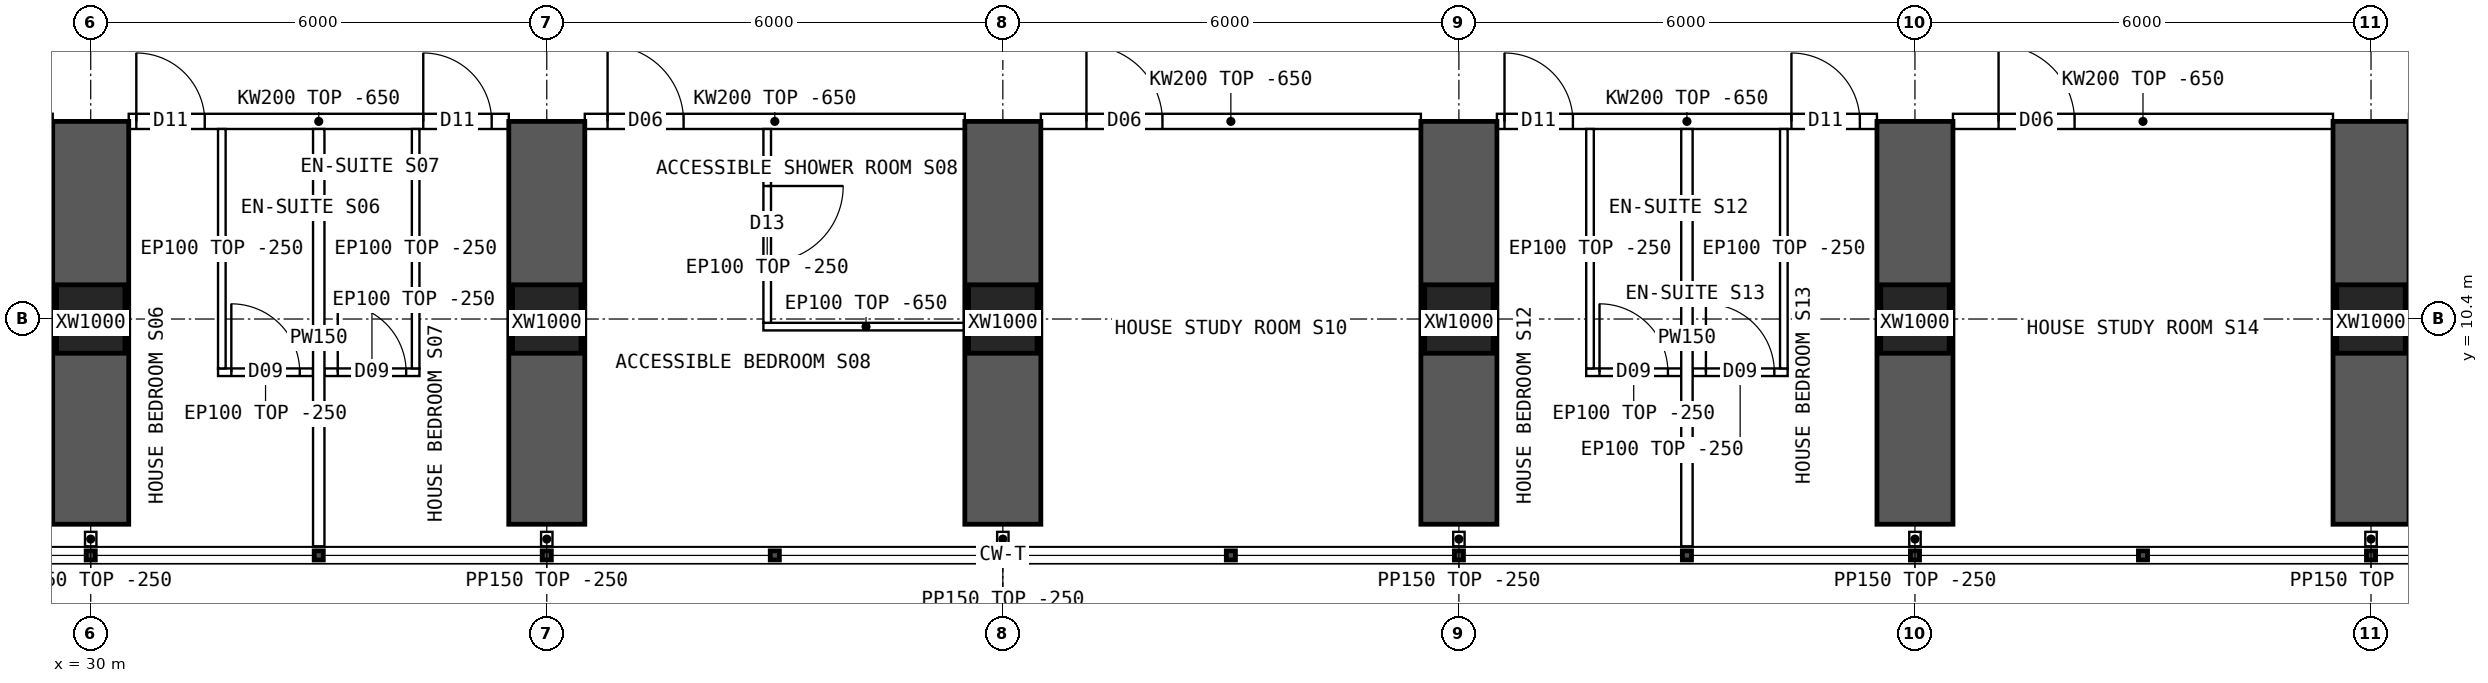
"""IFC4 building model, lengths in metres.
Left out: names, types, materials, properties, quantities, classifications, styles, units other than length and angle.
Written with IfcOpenShell. Run it as: python <this file> out.ifc"""

import sys

from ifc_helpers import new_model, si_unit, direction, frame, frame_2d, origin, origin_2d, place, context, subcontext, project, spatial, polyline, rectangle, hollow_rectangle, outline, extrude, element, fill, save


model = new_model("IFC4")
c1 = context("Model", 3, precision=1e-05, world=origin(), true_north=direction((0.0, 1.0)))
c2 = subcontext(c1, "Body", "Model", "MODEL_VIEW")
j1 = project(units=[si_unit("LENGTHUNIT", "METRE"), si_unit("PLANEANGLEUNIT", "RADIAN")], contexts=[c1])
p1 = place(None, origin())
s1 = spatial("IfcSite", under=j1, at=p1, CompositionType="ELEMENT")
p2 = place(p1, origin())
s2 = spatial("IfcBuilding", under=s1, at=p2, CompositionType="ELEMENT")
p3 = place(p2, frame((0.0, 0.0, 57.7)))
s3 = spatial("IfcBuildingStorey", under=s2, at=p3, CompositionType="ELEMENT", Elevation=57.7)
for number, where, z_axis, x_axis in (
    (1, (30.0, 10.4, 0.0), (0.0, 0.0, 1.0), (1.0, 0.0, 0.0)),
    (2, (36.0, 10.4, 0.0), (0.0, 0.0, 1.0), (1.0, 0.0, 0.0)),
    (3, (42.0, 10.4, 0.0), (0.0, 0.0, 1.0), (1.0, 0.0, 0.0)),
    (4, (48.0, 10.4, 0.0), (0.0, 0.0, 1.0), (1.0, 0.0, 0.0)),
    (5, (54.0, 10.4, 0.0), (0.0, 0.0, 1.0), (1.0, 0.0, 0.0)),
    (6, (60.0, 10.4, 0.0), (0.0, 0.0, 1.0), (1.0, 0.0, 0.0)),
):
    element("IfcColumn", number, at=place(p3, frame(where, z_axis=z_axis, x_axis=x_axis)), inside=s3, PredefinedType="COLUMN", context=c2, shape_type="SweptSolid", body=[
        extrude(hollow_rectangle(XDim=0.9, YDim=0.9, WallThickness=0.09, at=origin_2d()), origin(), (0.0, 0.0, 1.0), 3.75),
    ])
for number, where, z_axis, x_axis in (
    (7, (30.0, 7.7, 0.0), (0.0, 0.0, 1.0), (0.0, 1.0, 0.0)),
    (8, (36.0, 7.7, 0.0), (0.0, 0.0, 1.0), (0.0, 1.0, 0.0)),
    (9, (42.0, 7.7, 0.0), (0.0, 0.0, 1.0), (0.0, 1.0, 0.0)),
    (10, (48.0, 7.7, 0.0), (0.0, 0.0, 1.0), (0.0, 1.0, 0.0)),
    (11, (54.0, 7.7, 0.0), (0.0, 0.0, 1.0), (0.0, 1.0, 0.0)),
    (12, (60.0, 7.7, 0.0), (0.0, 0.0, 1.0), (0.0, 1.0, 0.0)),
):
    element("IfcWall", number, at=place(p3, frame(where, z_axis=z_axis, x_axis=x_axis)), inside=s3, PredefinedType="SHEAR", context=c2, shape_type="SweptSolid", body=[
        extrude(rectangle(XDim=5.3, YDim=1.0, at=frame_2d((2.65, 0.0))), origin(), (0.0, 0.0, 1.0), 3.75),
    ])
p4 = place(p3, frame((30.5, 13.0, 0.0), z_axis=(0.0, 0.0, 1.0), x_axis=(1.0, 0.0, 0.0)))
e13 = element("IfcWall", 13, at=p4, inside=s3, PredefinedType="SOLIDWALL", context=c2, shape_type="SweptSolid", body=[
    extrude(outline(polyline([(0.0, 0.0), (5.0, 0.0), (5.0, 3.1), (0.0, 3.1), (0.0, 0.0)])), frame((0.0, 0.1, 0.0), z_axis=(0.0, -1.0, 0.0), x_axis=(1.0, 0.0, 0.0)), (0.0, 0.0, 1.0), 0.2),
])
p5 = place(p4, frame((0.1, 0.0, 0.0)))
e14 = element("IfcOpeningElement", 14, at=p5, cuts=e13, PredefinedType="OPENING", context=c2, shape_type="SweptSolid", body=[
    extrude(rectangle(XDim=0.9, YDim=2.1, at=frame_2d((0.45, 1.05))), frame((0.0, 0.11, 0.0), z_axis=(0.0, -1.0, 0.0), x_axis=(1.0, 0.0, 0.0)), (0.0, 0.0, 1.0), 0.22),
])
p6 = place(p4, frame((3.875, 0.0, 0.0)))
e15 = element("IfcOpeningElement", 15, at=p6, cuts=e13, PredefinedType="OPENING", context=c2, shape_type="SweptSolid", body=[
    extrude(rectangle(XDim=0.9, YDim=2.1, at=frame_2d((0.45, 1.05))), frame((0.0, 0.11, 0.0), z_axis=(0.0, -1.0, 0.0), x_axis=(1.0, 0.0, 0.0)), (0.0, 0.0, 1.0), 0.22),
])
p7 = place(p3, frame((36.5, 13.0, 0.0), z_axis=(0.0, 0.0, 1.0), x_axis=(1.0, 0.0, 0.0)))
e16 = element("IfcWall", 16, at=p7, inside=s3, PredefinedType="SOLIDWALL", context=c2, shape_type="SweptSolid", body=[
    extrude(outline(polyline([(0.0, 0.0), (5.0, 0.0), (5.0, 3.1), (0.0, 3.1), (0.0, 0.0)])), frame((0.0, 0.1, 0.0), z_axis=(0.0, -1.0, 0.0), x_axis=(1.0, 0.0, 0.0)), (0.0, 0.0, 1.0), 0.2),
])
p8 = place(p7, frame((0.3, 0.0, 0.0)))
e17 = element("IfcOpeningElement", 17, at=p8, cuts=e16, PredefinedType="OPENING", context=c2, shape_type="SweptSolid", body=[
    extrude(rectangle(XDim=1.0, YDim=2.1, at=frame_2d((0.5, 1.05))), frame((0.0, 0.11, 0.0), z_axis=(0.0, -1.0, 0.0), x_axis=(1.0, 0.0, 0.0)), (0.0, 0.0, 1.0), 0.22),
])
p9 = place(p3, frame((42.5, 13.0, 0.0), z_axis=(0.0, 0.0, 1.0), x_axis=(1.0, 0.0, 0.0)))
e18 = element("IfcWall", 18, at=p9, inside=s3, PredefinedType="SOLIDWALL", context=c2, shape_type="SweptSolid", body=[
    extrude(outline(polyline([(0.0, 0.0), (5.0, 0.0), (5.0, 3.1), (0.0, 3.1), (0.0, 0.0)])), frame((0.0, 0.1, 0.0), z_axis=(0.0, -1.0, 0.0), x_axis=(1.0, 0.0, 0.0)), (0.0, 0.0, 1.0), 0.2),
])
p10 = place(p9, frame((0.6, 0.0, 0.0)))
e19 = element("IfcOpeningElement", 19, at=p10, cuts=e18, PredefinedType="OPENING", context=c2, shape_type="SweptSolid", body=[
    extrude(rectangle(XDim=1.0, YDim=2.1, at=frame_2d((0.5, 1.05))), frame((0.0, 0.11, 0.0), z_axis=(0.0, -1.0, 0.0), x_axis=(1.0, 0.0, 0.0)), (0.0, 0.0, 1.0), 0.22),
])
p11 = place(p3, frame((48.5, 13.0, 0.0), z_axis=(0.0, 0.0, 1.0), x_axis=(1.0, 0.0, 0.0)))
e20 = element("IfcWall", 20, at=p11, inside=s3, PredefinedType="SOLIDWALL", context=c2, shape_type="SweptSolid", body=[
    extrude(outline(polyline([(0.0, 0.0), (5.0, 0.0), (5.0, 3.1), (0.0, 3.1), (0.0, 0.0)])), frame((0.0, 0.1, 0.0), z_axis=(0.0, -1.0, 0.0), x_axis=(1.0, 0.0, 0.0)), (0.0, 0.0, 1.0), 0.2),
])
p12 = place(p11, frame((0.1, 0.0, 0.0)))
e21 = element("IfcOpeningElement", 21, at=p12, cuts=e20, PredefinedType="OPENING", context=c2, shape_type="SweptSolid", body=[
    extrude(rectangle(XDim=0.9, YDim=2.1, at=frame_2d((0.45, 1.05))), frame((0.0, 0.11, 0.0), z_axis=(0.0, -1.0, 0.0), x_axis=(1.0, 0.0, 0.0)), (0.0, 0.0, 1.0), 0.22),
])
p13 = place(p11, frame((3.875, 0.0, 0.0)))
e22 = element("IfcOpeningElement", 22, at=p13, cuts=e20, PredefinedType="OPENING", context=c2, shape_type="SweptSolid", body=[
    extrude(rectangle(XDim=0.9, YDim=2.1, at=frame_2d((0.45, 1.05))), frame((0.0, 0.11, 0.0), z_axis=(0.0, -1.0, 0.0), x_axis=(1.0, 0.0, 0.0)), (0.0, 0.0, 1.0), 0.22),
])
p14 = place(p3, frame((54.5, 13.0, 0.0), z_axis=(0.0, 0.0, 1.0), x_axis=(1.0, 0.0, 0.0)))
e23 = element("IfcWall", 23, at=p14, inside=s3, PredefinedType="SOLIDWALL", context=c2, shape_type="SweptSolid", body=[
    extrude(outline(polyline([(0.0, 0.0), (5.0, 0.0), (5.0, 3.1), (0.0, 3.1), (0.0, 0.0)])), frame((0.0, 0.1, 0.0), z_axis=(0.0, -1.0, 0.0), x_axis=(1.0, 0.0, 0.0)), (0.0, 0.0, 1.0), 0.2),
])
p15 = place(p14, frame((0.6, 0.0, 0.0)))
e24 = element("IfcOpeningElement", 24, at=p15, cuts=e23, PredefinedType="OPENING", context=c2, shape_type="SweptSolid", body=[
    extrude(rectangle(XDim=1.0, YDim=2.1, at=frame_2d((0.5, 1.05))), frame((0.0, 0.11, 0.0), z_axis=(0.0, -1.0, 0.0), x_axis=(1.0, 0.0, 0.0)), (0.0, 0.0, 1.0), 0.22),
])
p16 = place(p3, frame((33.0, 7.41, 0.0), z_axis=(0.0, 0.0, 1.0), x_axis=(0.0, 1.0, 0.0)))
e25 = element("IfcWall", 25, at=p16, inside=s3, PredefinedType="PARTITIONING", context=c2, shape_type="SweptSolid", body=[
    extrude(outline(polyline([(0.0, 0.0), (5.49, 0.0), (5.49, 3.1), (5.442, 3.1), (5.44, 3.5), (3.192, 3.5), (3.19, 3.1), (2.792, 3.1), (2.79, 3.5), (0.0, 3.5), (0.0, 0.0)])), frame((0.0, 0.075, 0.0), z_axis=(0.0, -1.0, 0.0), x_axis=(1.0, 0.0, 0.0)), (0.0, 0.0, 1.0), 0.15),
])
p17 = place(p3, frame((32.925, 9.7, 0.0), z_axis=(0.0, 0.0, 1.0), x_axis=(-1.0, 0.0, 0.0)))
e26 = element("IfcWall", 26, at=p17, inside=s3, PredefinedType="PARTITIONING", context=c2, shape_type="SweptSolid", body=[
    extrude(rectangle(XDim=1.25, YDim=0.1, at=frame_2d((0.625, 0.0))), origin(), (0.0, 0.0, 1.0), 3.5),
])
p18 = place(p17, frame((0.175, 0.0, 0.0)))
e27 = element("IfcOpeningElement", 27, at=p18, cuts=e26, PredefinedType="OPENING", context=c2, shape_type="SweptSolid", body=[
    extrude(rectangle(XDim=0.9, YDim=2.1, at=frame_2d((0.45, 1.05))), frame((0.0, 0.06, 0.0), z_axis=(0.0, -1.0, 0.0), x_axis=(1.0, 0.0, 0.0)), (0.0, 0.0, 1.0), 0.12),
])
p19 = place(p3, frame((31.725, 9.75, 0.0), z_axis=(0.0, 0.0, 1.0), x_axis=(0.0, 1.0, 0.0)))
e28 = element("IfcWall", 28, at=p19, inside=s3, PredefinedType="PARTITIONING", context=c2, shape_type="SweptSolid", body=[
    extrude(outline(polyline([(0.0, 0.0), (3.15, 0.0), (3.15, 3.1), (3.102, 3.1), (3.1, 3.5), (0.852, 3.5), (0.85, 3.1), (0.452, 3.1), (0.45, 3.5), (0.0, 3.5), (0.0, 0.0)])), frame((0.0, 0.05, 0.0), z_axis=(0.0, -1.0, 0.0), x_axis=(1.0, 0.0, 0.0)), (0.0, 0.0, 1.0), 0.1),
])
p20 = place(p3, frame((34.325, 9.7, 0.0), z_axis=(0.0, 0.0, 1.0), x_axis=(-1.0, 0.0, 0.0)))
e29 = element("IfcWall", 29, at=p20, inside=s3, PredefinedType="PARTITIONING", context=c2, shape_type="SweptSolid", body=[
    extrude(rectangle(XDim=1.25, YDim=0.1, at=frame_2d((0.625, 0.0))), origin(), (0.0, 0.0, 1.0), 3.5),
])
p21 = place(p20, frame((0.175, 0.0, 0.0)))
e30 = element("IfcOpeningElement", 30, at=p21, cuts=e29, PredefinedType="OPENING", context=c2, shape_type="SweptSolid", body=[
    extrude(rectangle(XDim=0.9, YDim=2.1, at=frame_2d((0.45, 1.05))), frame((0.0, 0.06, 0.0), z_axis=(0.0, -1.0, 0.0), x_axis=(1.0, 0.0, 0.0)), (0.0, 0.0, 1.0), 0.12),
])
p22 = place(p3, frame((34.275, 9.75, 0.0), z_axis=(0.0, 0.0, 1.0), x_axis=(0.0, 1.0, 0.0)))
e31 = element("IfcWall", 31, at=p22, inside=s3, PredefinedType="PARTITIONING", context=c2, shape_type="SweptSolid", body=[
    extrude(outline(polyline([(0.0, 0.0), (3.15, 0.0), (3.15, 3.1), (3.102, 3.1), (3.1, 3.5), (0.852, 3.5), (0.85, 3.1), (0.452, 3.1), (0.45, 3.5), (0.0, 3.5), (0.0, 0.0)])), frame((0.0, 0.05, 0.0), z_axis=(0.0, -1.0, 0.0), x_axis=(1.0, 0.0, 0.0)), (0.0, 0.0, 1.0), 0.1),
])
p23 = place(p3, frame((38.85, 10.3, 0.0), z_axis=(0.0, 0.0, 1.0), x_axis=(1.0, 0.0, 0.0)))
e32 = element("IfcWall", 32, at=p23, inside=s3, PredefinedType="PARTITIONING", context=c2, shape_type="SweptSolid", body=[
    extrude(outline(polyline([(0.0, 0.0), (2.7, 0.0), (2.7, 3.1), (0.0, 3.1), (0.0, 0.0)])), frame((0.0, 0.05, 0.0), z_axis=(0.0, -1.0, 0.0), x_axis=(1.0, 0.0, 0.0)), (0.0, 0.0, 1.0), 0.1),
])
p24 = place(p3, frame((38.9, 10.35, 0.0), z_axis=(0.0, 0.0, 1.0), x_axis=(0.0, 1.0, 0.0)))
e33 = element("IfcWall", 33, at=p24, inside=s3, PredefinedType="PARTITIONING", context=c2, shape_type="SweptSolid", body=[
    extrude(outline(polyline([(0.0, 0.0), (2.55, 0.0), (2.55, 3.1), (2.502, 3.1), (2.5, 3.5), (0.252, 3.5), (0.25, 3.1), (0.0, 3.1), (0.0, 0.0)])), frame((0.0, 0.05, 0.0), z_axis=(0.0, -1.0, 0.0), x_axis=(1.0, 0.0, 0.0)), (0.0, 0.0, 1.0), 0.1),
])
p25 = place(p24, frame((0.8, 0.0, 0.0)))
e34 = element("IfcOpeningElement", 34, at=p25, cuts=e33, PredefinedType="OPENING", context=c2, shape_type="SweptSolid", body=[
    extrude(rectangle(XDim=1.0, YDim=2.1, at=frame_2d((0.5, 1.05))), frame((0.0, 0.06, 0.0), z_axis=(0.0, -1.0, 0.0), x_axis=(1.0, 0.0, 0.0)), (0.0, 0.0, 1.0), 0.12),
])
p26 = place(p3, frame((51.0, 7.41, 0.0), z_axis=(0.0, 0.0, 1.0), x_axis=(0.0, 1.0, 0.0)))
e35 = element("IfcWall", 35, at=p26, inside=s3, PredefinedType="PARTITIONING", context=c2, shape_type="SweptSolid", body=[
    extrude(outline(polyline([(0.0, 0.0), (5.49, 0.0), (5.49, 3.1), (5.442, 3.1), (5.44, 3.5), (3.192, 3.5), (3.19, 3.1), (2.792, 3.1), (2.79, 3.5), (0.0, 3.5), (0.0, 0.0)])), frame((0.0, 0.075, 0.0), z_axis=(0.0, -1.0, 0.0), x_axis=(1.0, 0.0, 0.0)), (0.0, 0.0, 1.0), 0.15),
])
p27 = place(p3, frame((50.925, 9.7, 0.0), z_axis=(0.0, 0.0, 1.0), x_axis=(-1.0, 0.0, 0.0)))
e36 = element("IfcWall", 36, at=p27, inside=s3, PredefinedType="PARTITIONING", context=c2, shape_type="SweptSolid", body=[
    extrude(rectangle(XDim=1.25, YDim=0.1, at=frame_2d((0.625, 0.0))), origin(), (0.0, 0.0, 1.0), 3.5),
])
p28 = place(p27, frame((0.175, 0.0, 0.0)))
e37 = element("IfcOpeningElement", 37, at=p28, cuts=e36, PredefinedType="OPENING", context=c2, shape_type="SweptSolid", body=[
    extrude(rectangle(XDim=0.9, YDim=2.1, at=frame_2d((0.45, 1.05))), frame((0.0, 0.06, 0.0), z_axis=(0.0, -1.0, 0.0), x_axis=(1.0, 0.0, 0.0)), (0.0, 0.0, 1.0), 0.12),
])
p29 = place(p3, frame((49.725, 9.75, 0.0), z_axis=(0.0, 0.0, 1.0), x_axis=(0.0, 1.0, 0.0)))
e38 = element("IfcWall", 38, at=p29, inside=s3, PredefinedType="PARTITIONING", context=c2, shape_type="SweptSolid", body=[
    extrude(outline(polyline([(0.0, 0.0), (3.15, 0.0), (3.15, 3.1), (3.102, 3.1), (3.1, 3.5), (0.852, 3.5), (0.85, 3.1), (0.452, 3.1), (0.45, 3.5), (0.0, 3.5), (0.0, 0.0)])), frame((0.0, 0.05, 0.0), z_axis=(0.0, -1.0, 0.0), x_axis=(1.0, 0.0, 0.0)), (0.0, 0.0, 1.0), 0.1),
])
p30 = place(p3, frame((52.325, 9.7, 0.0), z_axis=(0.0, 0.0, 1.0), x_axis=(-1.0, 0.0, 0.0)))
e39 = element("IfcWall", 39, at=p30, inside=s3, PredefinedType="PARTITIONING", context=c2, shape_type="SweptSolid", body=[
    extrude(rectangle(XDim=1.25, YDim=0.1, at=frame_2d((0.625, 0.0))), origin(), (0.0, 0.0, 1.0), 3.5),
])
p31 = place(p30, frame((0.175, 0.0, 0.0)))
e40 = element("IfcOpeningElement", 40, at=p31, cuts=e39, PredefinedType="OPENING", context=c2, shape_type="SweptSolid", body=[
    extrude(rectangle(XDim=0.9, YDim=2.1, at=frame_2d((0.45, 1.05))), frame((0.0, 0.06, 0.0), z_axis=(0.0, -1.0, 0.0), x_axis=(1.0, 0.0, 0.0)), (0.0, 0.0, 1.0), 0.12),
])
p32 = place(p3, frame((52.275, 9.75, 0.0), z_axis=(0.0, 0.0, 1.0), x_axis=(0.0, 1.0, 0.0)))
e41 = element("IfcWall", 41, at=p32, inside=s3, PredefinedType="PARTITIONING", context=c2, shape_type="SweptSolid", body=[
    extrude(outline(polyline([(0.0, 0.0), (3.15, 0.0), (3.15, 3.1), (3.102, 3.1), (3.1, 3.5), (0.852, 3.5), (0.85, 3.1), (0.452, 3.1), (0.45, 3.5), (0.0, 3.5), (0.0, 0.0)])), frame((0.0, 0.05, 0.0), z_axis=(0.0, -1.0, 0.0), x_axis=(1.0, 0.0, 0.0)), (0.0, 0.0, 1.0), 0.1),
])
for number, where, z_axis, x_axis in (
    (42, (30.0, 7.6, 0.0), (0.0, 0.0, 1.0), (0.0, -1.0, 0.0)),
    (43, (36.0, 7.6, 0.0), (0.0, 0.0, 1.0), (0.0, -1.0, 0.0)),
    (44, (42.0, 7.6, 0.0), (0.0, 0.0, 1.0), (0.0, -1.0, 0.0)),
    (45, (48.0, 7.6, 0.0), (0.0, 0.0, 1.0), (0.0, -1.0, 0.0)),
    (46, (54.0, 7.6, 0.0), (0.0, 0.0, 1.0), (0.0, -1.0, 0.0)),
    (47, (60.0, 7.6, 0.0), (0.0, 0.0, 1.0), (0.0, -1.0, 0.0)),
):
    element("IfcWall", number, at=place(p3, frame(where, z_axis=z_axis, x_axis=x_axis)), inside=s3, PredefinedType="PARTITIONING", context=c2, shape_type="SweptSolid", body=[
        extrude(rectangle(XDim=0.19, YDim=0.15, at=frame_2d((0.095, 0.0))), origin(), (0.0, 0.0, 1.0), 3.5),
    ])
p33 = place(p18, origin())
e48 = element("IfcDoor", 48, at=p33, inside=s3, OperationType="SINGLE_SWING_RIGHT", PredefinedType="DOOR", context=c2, shape_type="SweptSolid", body=[
    extrude(rectangle(XDim=0.9, YDim=2.1, at=frame_2d((0.45, 1.05))), frame((0.0, 0.025, 0.0), z_axis=(0.0, -1.0, 0.0), x_axis=(1.0, 0.0, 0.0)), (0.0, 0.0, 1.0), 0.05),
])
fill(e27, e48)
p34 = place(p5, origin())
e49 = element("IfcDoor", 49, at=p34, inside=s3, OperationType="SINGLE_SWING_LEFT", PredefinedType="DOOR", context=c2, shape_type="SweptSolid", body=[
    extrude(rectangle(XDim=0.9, YDim=2.1, at=frame_2d((0.45, 1.05))), frame((0.0, 0.025, 0.0), z_axis=(0.0, -1.0, 0.0), x_axis=(1.0, 0.0, 0.0)), (0.0, 0.0, 1.0), 0.05),
])
fill(e14, e49)
p35 = place(p21, origin())
e50 = element("IfcDoor", 50, at=p35, inside=s3, OperationType="SINGLE_SWING_RIGHT", PredefinedType="DOOR", context=c2, shape_type="SweptSolid", body=[
    extrude(rectangle(XDim=0.9, YDim=2.1, at=frame_2d((0.45, 1.05))), frame((0.0, 0.025, 0.0), z_axis=(0.0, -1.0, 0.0), x_axis=(1.0, 0.0, 0.0)), (0.0, 0.0, 1.0), 0.05),
])
fill(e30, e50)
p36 = place(p6, origin())
e51 = element("IfcDoor", 51, at=p36, inside=s3, OperationType="SINGLE_SWING_LEFT", PredefinedType="DOOR", context=c2, shape_type="SweptSolid", body=[
    extrude(rectangle(XDim=0.9, YDim=2.1, at=frame_2d((0.45, 1.05))), frame((0.0, 0.025, 0.0), z_axis=(0.0, -1.0, 0.0), x_axis=(1.0, 0.0, 0.0)), (0.0, 0.0, 1.0), 0.05),
])
fill(e15, e51)
p37 = place(p25, origin())
e52 = element("IfcDoor", 52, at=p37, inside=s3, OperationType="SINGLE_SWING_RIGHT", PredefinedType="DOOR", context=c2, shape_type="SweptSolid", body=[
    extrude(rectangle(XDim=1.0, YDim=2.1, at=frame_2d((0.5, 1.05))), frame((0.0, 0.025, 0.0), z_axis=(0.0, -1.0, 0.0), x_axis=(1.0, 0.0, 0.0)), (0.0, 0.0, 1.0), 0.05),
])
fill(e34, e52)
p38 = place(p8, origin())
e53 = element("IfcDoor", 53, at=p38, inside=s3, OperationType="SINGLE_SWING_LEFT", PredefinedType="DOOR", context=c2, shape_type="SweptSolid", body=[
    extrude(rectangle(XDim=1.0, YDim=2.1, at=frame_2d((0.5, 1.05))), frame((0.0, 0.025, 0.0), z_axis=(0.0, -1.0, 0.0), x_axis=(1.0, 0.0, 0.0)), (0.0, 0.0, 1.0), 0.05),
])
fill(e17, e53)
p39 = place(p10, origin())
e54 = element("IfcDoor", 54, at=p39, inside=s3, OperationType="SINGLE_SWING_LEFT", PredefinedType="DOOR", context=c2, shape_type="SweptSolid", body=[
    extrude(rectangle(XDim=1.0, YDim=2.1, at=frame_2d((0.5, 1.05))), frame((0.0, 0.025, 0.0), z_axis=(0.0, -1.0, 0.0), x_axis=(1.0, 0.0, 0.0)), (0.0, 0.0, 1.0), 0.05),
])
fill(e19, e54)
p40 = place(p28, origin())
e55 = element("IfcDoor", 55, at=p40, inside=s3, OperationType="SINGLE_SWING_RIGHT", PredefinedType="DOOR", context=c2, shape_type="SweptSolid", body=[
    extrude(rectangle(XDim=0.9, YDim=2.1, at=frame_2d((0.45, 1.05))), frame((0.0, 0.025, 0.0), z_axis=(0.0, -1.0, 0.0), x_axis=(1.0, 0.0, 0.0)), (0.0, 0.0, 1.0), 0.05),
])
fill(e37, e55)
p41 = place(p12, origin())
e56 = element("IfcDoor", 56, at=p41, inside=s3, OperationType="SINGLE_SWING_LEFT", PredefinedType="DOOR", context=c2, shape_type="SweptSolid", body=[
    extrude(rectangle(XDim=0.9, YDim=2.1, at=frame_2d((0.45, 1.05))), frame((0.0, 0.025, 0.0), z_axis=(0.0, -1.0, 0.0), x_axis=(1.0, 0.0, 0.0)), (0.0, 0.0, 1.0), 0.05),
])
fill(e21, e56)
p42 = place(p31, origin())
e57 = element("IfcDoor", 57, at=p42, inside=s3, OperationType="SINGLE_SWING_RIGHT", PredefinedType="DOOR", context=c2, shape_type="SweptSolid", body=[
    extrude(rectangle(XDim=0.9, YDim=2.1, at=frame_2d((0.45, 1.05))), frame((0.0, 0.025, 0.0), z_axis=(0.0, -1.0, 0.0), x_axis=(1.0, 0.0, 0.0)), (0.0, 0.0, 1.0), 0.05),
])
fill(e40, e57)
p43 = place(p13, origin())
e58 = element("IfcDoor", 58, at=p43, inside=s3, OperationType="SINGLE_SWING_LEFT", PredefinedType="DOOR", context=c2, shape_type="SweptSolid", body=[
    extrude(rectangle(XDim=0.9, YDim=2.1, at=frame_2d((0.45, 1.05))), frame((0.0, 0.025, 0.0), z_axis=(0.0, -1.0, 0.0), x_axis=(1.0, 0.0, 0.0)), (0.0, 0.0, 1.0), 0.05),
])
fill(e22, e58)
p44 = place(p15, origin())
e59 = element("IfcDoor", 59, at=p44, inside=s3, OperationType="SINGLE_SWING_LEFT", PredefinedType="DOOR", context=c2, shape_type="SweptSolid", body=[
    extrude(rectangle(XDim=1.0, YDim=2.1, at=frame_2d((0.5, 1.05))), frame((0.0, 0.025, 0.0), z_axis=(0.0, -1.0, 0.0), x_axis=(1.0, 0.0, 0.0)), (0.0, 0.0, 1.0), 0.05),
])
fill(e24, e59)
save(model, sys.argv[1])
